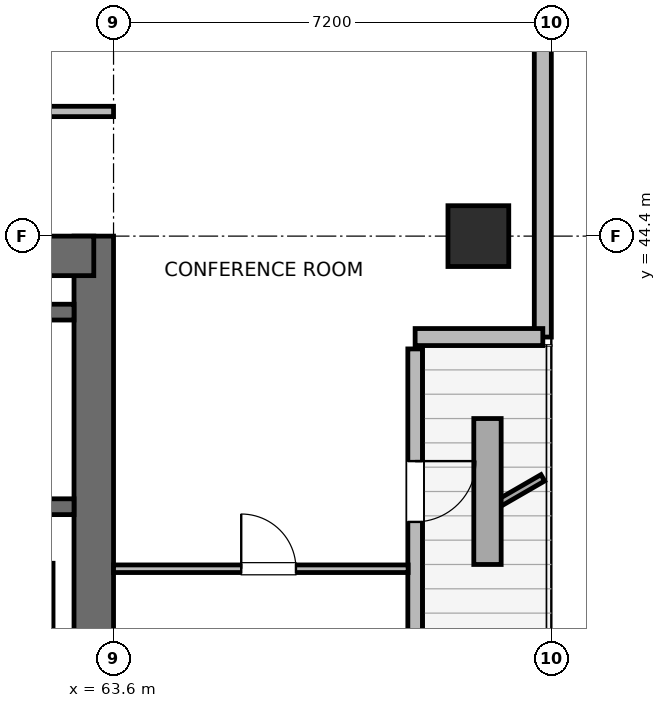
"""IFC4 building model, lengths in metres.
Left out: names, types, materials, properties, quantities, classifications, styles, units other than length and angle.
Written with IfcOpenShell. Run it as: python <this file> out.ifc"""

import sys

from ifc_helpers import new_model, si_unit, direction, frame, frame_2d, origin, origin_2d, place, context, subcontext, project, spatial, rectangle, extrude, element, fill, save


model = new_model("IFC4")
c1 = context("Model", 3, precision=1e-05, world=origin(), true_north=direction((0.0, 1.0)))
c2 = subcontext(c1, "Body", "Model", "MODEL_VIEW")
j1 = project(units=[si_unit("LENGTHUNIT", "METRE"), si_unit("PLANEANGLEUNIT", "RADIAN")], contexts=[c1])
p1 = place(None, origin())
s1 = spatial("IfcSite", under=j1, at=p1, CompositionType="ELEMENT")
p2 = place(p1, origin())
s2 = spatial("IfcBuilding", under=s1, at=p2, CompositionType="ELEMENT")
p3 = place(p2, frame((0.0, 0.0, 231.0)))
s3 = spatial("IfcBuildingStorey", under=s2, at=p3, CompositionType="ELEMENT", Elevation=231.0)
p4 = place(p3, frame((63.275, 27.6, 0.0), z_axis=(0.0, 0.0, 1.0), x_axis=(0.0, 1.0, 0.0)))
e1 = element("IfcWall", 1, at=p4, inside=s3, PredefinedType="SHEAR", context=c2, shape_type="SweptSolid", body=[
    extrude(rectangle(XDim=16.8, YDim=0.65, at=frame_2d((8.4, 0.0))), origin(), (0.0, 0.0, 1.0), 3.9),
])
p5 = place(p3, frame((53.925, 44.075, 0.0), z_axis=(0.0, 0.0, 1.0), x_axis=(1.0, 0.0, 0.0)))
e2 = element("IfcWall", 2, at=p5, inside=s3, PredefinedType="SHEAR", context=c2, shape_type="SweptSolid", body=[
    extrude(rectangle(XDim=9.35, YDim=0.65, at=frame_2d((4.675, 0.0))), origin(), (0.0, 0.0, 1.0), 3.9),
])
p6 = place(p3, frame((54.25, 39.95, 0.0), z_axis=(0.0, 0.0, 1.0), x_axis=(1.0, 0.0, 0.0)))
e3 = element("IfcWall", 3, at=p6, inside=s3, PredefinedType="SHEAR", context=c2, shape_type="SweptSolid", body=[
    extrude(rectangle(XDim=8.7, YDim=0.26, at=frame_2d((4.35, 0.0))), origin(), (0.0, 0.0, 1.0), 3.9),
])
p7 = place(p6, frame((0.95, 0.0, 0.0)))
e4 = element("IfcOpeningElement", 4, at=p7, cuts=e3, PredefinedType="OPENING", context=c2, shape_type="SweptSolid", body=[
    extrude(rectangle(XDim=1.0, YDim=2.04, at=frame_2d((0.5, 1.02))), frame((0.0, 0.14, 0.0), z_axis=(0.0, -1.0, 0.0), x_axis=(1.0, 0.0, 0.0)), (0.0, 0.0, 1.0), 0.28),
])
p8 = place(p3, frame((54.25, 43.15, 0.0), z_axis=(0.0, 0.0, 1.0), x_axis=(1.0, 0.0, 0.0)))
e5 = element("IfcWall", 5, at=p8, inside=s3, PredefinedType="SHEAR", context=c2, shape_type="SweptSolid", body=[
    extrude(rectangle(XDim=8.7, YDim=0.26, at=frame_2d((4.35, 0.0))), origin(), (0.0, 0.0, 1.0), 3.9),
])
p9 = place(p3, frame((69.6, 44.4, 0.0), z_axis=(0.0, 0.0, 1.0), x_axis=(1.0, 0.0, 0.0)))
e6 = element("IfcColumn", 6, at=p9, inside=s3, PredefinedType="COLUMN", context=c2, shape_type="SweptSolid", body=[
    extrude(rectangle(XDim=1.0, YDim=1.0, at=origin_2d()), origin(), (0.0, 0.0, 1.0), 3.9),
])
p10 = place(p3, frame((70.66, 57.182, 0.0), z_axis=(0.0, 0.0, 1.0), x_axis=(0.0, -1.0, 0.0)))
e7 = element("IfcWall", 7, at=p10, inside=s3, PredefinedType="SOLIDWALL", context=c2, shape_type="SweptSolid", body=[
    extrude(rectangle(XDim=14.442, YDim=0.28, at=frame_2d((7.221, 0.0))), origin(), (0.0, 0.0, 1.0), 3.68),
])
p11 = place(p3, frame((70.66, 42.74, 0.0), z_axis=(0.0, 0.0, 1.0), x_axis=(-1.0, 0.0, 0.0)))
e8 = element("IfcWall", 8, at=p11, inside=s3, PredefinedType="SOLIDWALL", context=c2, shape_type="SweptSolid", body=[
    extrude(rectangle(XDim=2.1, YDim=0.28, at=frame_2d((1.05, 0.0))), origin(), (0.0, 0.0, 1.0), 3.116),
])
p12 = place(p3, frame((68.56, 42.545, 0.0), z_axis=(0.0, 0.0, 1.0), x_axis=(0.0, -1.0, 0.0)))
e9 = element("IfcWall", 9, at=p12, inside=s3, PredefinedType="SOLIDWALL", context=c2, shape_type="SweptSolid", body=[
    extrude(rectangle(XDim=4.69, YDim=0.24, at=frame_2d((2.345, 0.0))), origin(), (0.0, 0.0, 1.0), 3.248),
])
p13 = place(p12, frame((1.845, 0.0, 0.0)))
e10 = element("IfcOpeningElement", 10, at=p13, cuts=e9, PredefinedType="OPENING", context=c2, shape_type="SweptSolid", body=[
    extrude(rectangle(XDim=1.0, YDim=2.02, at=frame_2d((0.5, 1.01))), frame((0.0, 0.13, 0.0), z_axis=(0.0, -1.0, 0.0), x_axis=(1.0, 0.0, 0.0)), (0.0, 0.0, 1.0), 0.26),
])
p14 = place(p3, frame((62.5, 36.98, 0.0), z_axis=(0.0, 0.0, 1.0), x_axis=(0.0, 1.0, 0.0)))
e11 = element("IfcWall", 11, at=p14, inside=s3, PredefinedType="PARTITIONING", context=c2, shape_type="SweptSolid", body=[
    extrude(rectangle(XDim=2.04, YDim=0.21, at=frame_2d((1.02, 0.0))), origin(), (0.0, 0.0, 1.0), 3.68),
])
p15 = place(p3, frame((30.35, 46.45, 0.0), z_axis=(0.0, 0.0, 1.0), x_axis=(1.0, 0.0, 0.0)))
e12 = element("IfcWall", 12, at=p15, inside=s3, PredefinedType="PARTITIONING", context=c2, shape_type="SweptSolid", body=[
    extrude(rectangle(XDim=33.25, YDim=0.17, at=frame_2d((16.625, 0.0))), origin(), (0.0, 0.0, 1.0), 3.68),
])
p16 = place(p15, frame((2.74, 0.0, 0.0)))
e13 = element("IfcOpeningElement", 13, at=p16, cuts=e12, PredefinedType="OPENING", context=c2, shape_type="SweptSolid", body=[
    extrude(rectangle(XDim=0.95, YDim=2.04, at=frame_2d((0.475, 1.02))), frame((0.0, 0.095, 0.0), z_axis=(0.0, -1.0, 0.0), x_axis=(1.0, 0.0, 0.0)), (0.0, 0.0, 1.0), 0.19),
])
p17 = place(p15, frame((14.255, 0.0, 0.0)))
e14 = element("IfcOpeningElement", 14, at=p17, cuts=e12, PredefinedType="OPENING", context=c2, shape_type="SweptSolid", body=[
    extrude(rectangle(XDim=0.95, YDim=2.04, at=frame_2d((0.475, 1.02))), frame((0.0, 0.095, 0.0), z_axis=(0.0, -1.0, 0.0), x_axis=(1.0, 0.0, 0.0)), (0.0, 0.0, 1.0), 0.19),
])
p18 = place(p15, frame((27.665, 0.0, 0.0)))
e15 = element("IfcOpeningElement", 15, at=p18, cuts=e12, PredefinedType="OPENING", context=c2, shape_type="SweptSolid", body=[
    extrude(rectangle(XDim=0.95, YDim=2.04, at=frame_2d((0.475, 1.02))), frame((0.0, 0.095, 0.0), z_axis=(0.0, -1.0, 0.0), x_axis=(1.0, 0.0, 0.0)), (0.0, 0.0, 1.0), 0.19),
])
p19 = place(p3, frame((63.6, 38.93, 0.0), z_axis=(0.0, 0.0, 1.0), x_axis=(1.0, 0.0, 0.0)))
e16 = element("IfcWall", 16, at=p19, inside=s3, PredefinedType="PARTITIONING", context=c2, shape_type="SweptSolid", body=[
    extrude(rectangle(XDim=4.845, YDim=0.125, at=frame_2d((2.422, 0.0))), origin(), (0.0, 0.0, 1.0), 3.68),
])
p20 = place(p19, frame((2.1, 0.0, 0.0)))
e17 = element("IfcOpeningElement", 17, at=p20, cuts=e16, PredefinedType="OPENING", context=c2, shape_type="SweptSolid", body=[
    extrude(rectangle(XDim=0.9, YDim=2.02, at=frame_2d((0.45, 1.01))), frame((0.0, 0.073, 0.0), z_axis=(0.0, -1.0, 0.0), x_axis=(1.0, 0.0, 0.0)), (0.0, 0.0, 1.0), 0.145),
])
p21 = place(p13, origin())
e18 = element("IfcDoor", 18, at=p21, inside=s3, OperationType="SINGLE_SWING_LEFT", PredefinedType="DOOR", context=c2, shape_type="SweptSolid", body=[
    extrude(rectangle(XDim=1.0, YDim=2.02, at=frame_2d((0.5, 1.01))), frame((0.0, 0.025, 0.0), z_axis=(0.0, -1.0, 0.0), x_axis=(1.0, 0.0, 0.0)), (0.0, 0.0, 1.0), 0.05),
])
fill(e10, e18)
p22 = place(p20, origin())
e19 = element("IfcDoor", 19, at=p22, inside=s3, OperationType="SINGLE_SWING_LEFT", PredefinedType="DOOR", context=c2, shape_type="SweptSolid", body=[
    extrude(rectangle(XDim=0.9, YDim=2.02, at=frame_2d((0.45, 1.01))), frame((0.0, 0.025, 0.0), z_axis=(0.0, -1.0, 0.0), x_axis=(1.0, 0.0, 0.0)), (0.0, 0.0, 1.0), 0.05),
])
fill(e17, e19)
save(model, sys.argv[1])
